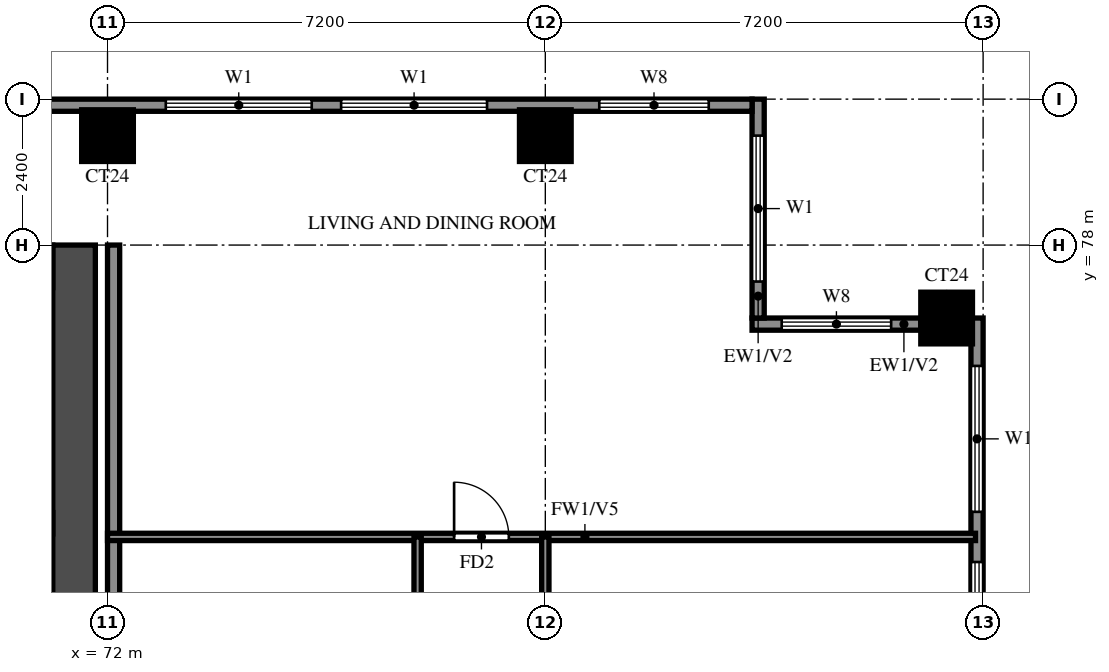
"""IFC4 building model, lengths in metres.
Left out: names, types, materials, properties, quantities, classifications, styles, units other than length and angle.
Written with IfcOpenShell. Run it as: python <this file> out.ifc"""

import sys

from ifc_helpers import new_model, si_unit, direction, frame, frame_2d, origin, origin_2d, place, context, subcontext, project, spatial, rectangle, extrude, source, transform, mapped, element, fill, save


model = new_model("IFC4")
c1 = context("Model", 3, precision=1e-05, world=origin(), true_north=direction((0.0, 1.0)))
c2 = subcontext(c1, "Body", "Model", "MODEL_VIEW")
j1 = project(units=[si_unit("LENGTHUNIT", "METRE"), si_unit("PLANEANGLEUNIT", "RADIAN")], contexts=[c1])
p1 = place(None, origin())
s1 = spatial("IfcSite", under=j1, at=p1, CompositionType="ELEMENT")
p2 = place(p1, origin())
s2 = spatial("IfcBuilding", under=s1, at=p2, CompositionType="ELEMENT")
p3 = place(p2, frame((0.0, 0.0, 153.5)))
s3 = spatial("IfcBuildingStorey", under=s2, at=p3, CompositionType="ELEMENT", Elevation=153.5)
m1 = source(origin(), c2, "Body", "SweptSolid", [
    extrude(rectangle(XDim=0.85, YDim=0.85, at=origin_2d()), origin(), (0.0, 0.0, 1.0), 3.2),
])
for number, where, z_axis, x_axis in (
    (1, (85.8, 76.8, 0.0), (0.0, 0.0, 1.0), (1.0, 0.0, 0.0)),
    (2, (72.0, 79.8, 0.0), (0.0, 0.0, 1.0), (1.0, 0.0, 0.0)),
    (3, (79.2, 79.8, 0.0), (0.0, 0.0, 1.0), (1.0, 0.0, 0.0)),
):
    element("IfcColumn", number, at=place(p3, frame(where, z_axis=z_axis, x_axis=x_axis)), inside=s3, PredefinedType="COLUMN", context=c2, shape_type="MappedRepresentation", body=[
        mapped(m1, transform((0.0, 0.0, 0.0))),
    ])
p4 = place(p3, frame((71.45, 66.1, 0.0), z_axis=(0.0, 0.0, 1.0), x_axis=(0.0, 1.0, 0.0)))
e4 = element("IfcWall", 4, at=p4, inside=s3, PredefinedType="SHEAR", context=c2, shape_type="SweptSolid", body=[
    extrude(rectangle(XDim=11.9, YDim=0.7, at=frame_2d((5.95, 0.0))), origin(), (0.0, 0.0, 1.0), 3.2),
])
p5 = place(p3, frame((29.7, 77.65, 0.0), z_axis=(0.0, 0.0, 1.0), x_axis=(1.0, 0.0, 0.0)))
e5 = element("IfcWall", 5, at=p5, inside=s3, PredefinedType="SHEAR", context=c2, shape_type="SweptSolid", body=[
    extrude(rectangle(XDim=41.4, YDim=0.7, at=frame_2d((20.7, 0.0))), origin(), (0.0, 0.0, 1.0), 3.2),
])
p6 = place(p3, frame((86.3, 48.2, 0.0), z_axis=(0.0, 0.0, 1.0), x_axis=(0.0, 1.0, 0.0)))
e6 = element("IfcWall", 6, at=p6, inside=s3, PredefinedType="SOLIDWALL", context=c2, shape_type="SweptSolid", body=[
    extrude(rectangle(XDim=28.6, YDim=0.2, at=frame_2d((14.3, 0.0))), origin(), (0.0, 0.0, 1.0), 3.2),
])
p7 = place(p6, frame((15.1, 0.0, 0.0)))
e7 = element("IfcOpeningElement", 7, at=p7, cuts=e6, PredefinedType="OPENING", context=c2, shape_type="SweptSolid", body=[
    extrude(rectangle(XDim=1.8, YDim=2.4, at=frame_2d((0.9, 1.2))), frame((0.0, 0.11, 0.0), z_axis=(0.0, -1.0, 0.0), x_axis=(1.0, 0.0, 0.0)), (0.0, 0.0, 1.0), 0.22),
])
p8 = place(p6, frame((0.6, 0.0, 0.6)))
e8 = element("IfcOpeningElement", 8, at=p8, cuts=e6, PredefinedType="OPENING", context=c2, shape_type="SweptSolid", body=[
    extrude(rectangle(XDim=2.4, YDim=2.4, at=frame_2d((1.2, 1.2))), frame((0.0, 0.11, 0.0), z_axis=(0.0, -1.0, 0.0), x_axis=(1.0, 0.0, 0.0)), (0.0, 0.0, 1.0), 0.22),
])
p9 = place(p6, frame((3.812, 0.0, 0.6)))
e9 = element("IfcOpeningElement", 9, at=p9, cuts=e6, PredefinedType="OPENING", context=c2, shape_type="SweptSolid", body=[
    extrude(rectangle(XDim=2.4, YDim=2.4, at=frame_2d((1.2, 1.2))), frame((0.0, 0.11, 0.0), z_axis=(0.0, -1.0, 0.0), x_axis=(1.0, 0.0, 0.0)), (0.0, 0.0, 1.0), 0.22),
])
p10 = place(p6, frame((8.387, 0.0, 0.6)))
e10 = element("IfcOpeningElement", 10, at=p10, cuts=e6, PredefinedType="OPENING", context=c2, shape_type="SweptSolid", body=[
    extrude(rectangle(XDim=2.4, YDim=2.4, at=frame_2d((1.2, 1.2))), frame((0.0, 0.11, 0.0), z_axis=(0.0, -1.0, 0.0), x_axis=(1.0, 0.0, 0.0)), (0.0, 0.0, 1.0), 0.22),
])
p11 = place(p6, frame((12.512, 0.0, 0.6)))
e11 = element("IfcOpeningElement", 11, at=p11, cuts=e6, PredefinedType="OPENING", context=c2, shape_type="SweptSolid", body=[
    extrude(rectangle(XDim=1.2, YDim=2.4, at=frame_2d((0.6, 1.2))), frame((0.0, 0.11, 0.0), z_axis=(0.0, -1.0, 0.0), x_axis=(1.0, 0.0, 0.0)), (0.0, 0.0, 1.0), 0.22),
])
p12 = place(p6, frame((19.113, 0.0, 0.6)))
e12 = element("IfcOpeningElement", 12, at=p12, cuts=e6, PredefinedType="OPENING", context=c2, shape_type="SweptSolid", body=[
    extrude(rectangle(XDim=1.8, YDim=2.4, at=frame_2d((0.9, 1.2))), frame((0.0, 0.11, 0.0), z_axis=(0.0, -1.0, 0.0), x_axis=(1.0, 0.0, 0.0)), (0.0, 0.0, 1.0), 0.22),
])
p13 = place(p6, frame((22.188, 0.0, 0.6)))
e13 = element("IfcOpeningElement", 13, at=p13, cuts=e6, PredefinedType="OPENING", context=c2, shape_type="SweptSolid", body=[
    extrude(rectangle(XDim=2.4, YDim=2.4, at=frame_2d((1.2, 1.2))), frame((0.0, 0.11, 0.0), z_axis=(0.0, -1.0, 0.0), x_axis=(1.0, 0.0, 0.0)), (0.0, 0.0, 1.0), 0.22),
])
p14 = place(p6, frame((25.413, 0.0, 0.6)))
e14 = element("IfcOpeningElement", 14, at=p14, cuts=e6, PredefinedType="OPENING", context=c2, shape_type="SweptSolid", body=[
    extrude(rectangle(XDim=2.4, YDim=2.4, at=frame_2d((1.2, 1.2))), frame((0.0, 0.11, 0.0), z_axis=(0.0, -1.0, 0.0), x_axis=(1.0, 0.0, 0.0)), (0.0, 0.0, 1.0), 0.22),
])
p15 = place(p3, frame((85.375, 76.7, 0.0), z_axis=(0.0, 0.0, 1.0), x_axis=(-1.0, 0.0, 0.0)))
e15 = element("IfcWall", 15, at=p15, inside=s3, PredefinedType="SOLIDWALL", context=c2, shape_type="SweptSolid", body=[
    extrude(rectangle(XDim=2.775, YDim=0.2, at=frame_2d((1.387, 0.0))), origin(), (0.0, 0.0, 1.0), 3.2),
])
p16 = place(p15, frame((0.488, 0.0, 0.6)))
e16 = element("IfcOpeningElement", 16, at=p16, cuts=e15, PredefinedType="OPENING", context=c2, shape_type="SweptSolid", body=[
    extrude(rectangle(XDim=1.8, YDim=2.4, at=frame_2d((0.9, 1.2))), frame((0.0, 0.11, 0.0), z_axis=(0.0, -1.0, 0.0), x_axis=(1.0, 0.0, 0.0)), (0.0, 0.0, 1.0), 0.22),
])
p17 = place(p3, frame((82.7, 76.8, 0.0), z_axis=(0.0, 0.0, 1.0), x_axis=(0.0, 1.0, 0.0)))
e17 = element("IfcWall", 17, at=p17, inside=s3, PredefinedType="SOLIDWALL", context=c2, shape_type="SweptSolid", body=[
    extrude(rectangle(XDim=3.6, YDim=0.2, at=frame_2d((1.8, 0.0))), origin(), (0.0, 0.0, 1.0), 3.2),
])
p18 = place(p17, frame((0.6, 0.0, 0.6)))
e18 = element("IfcOpeningElement", 18, at=p18, cuts=e17, PredefinedType="OPENING", context=c2, shape_type="SweptSolid", body=[
    extrude(rectangle(XDim=2.4, YDim=2.4, at=frame_2d((1.2, 1.2))), frame((0.0, 0.11, 0.0), z_axis=(0.0, -1.0, 0.0), x_axis=(1.0, 0.0, 0.0)), (0.0, 0.0, 1.0), 0.22),
])
p19 = place(p3, frame((82.6, 80.3, 0.0), z_axis=(0.0, 0.0, 1.0), x_axis=(-1.0, 0.0, 0.0)))
e19 = element("IfcWall", 19, at=p19, inside=s3, PredefinedType="SOLIDWALL", context=c2, shape_type="SweptSolid", body=[
    extrude(rectangle(XDim=64.6, YDim=0.2, at=frame_2d((32.3, 0.0))), origin(), (0.0, 0.0, 1.0), 3.2),
])
p20 = place(p19, frame((58.3, 0.0, 0.0)))
e20 = element("IfcOpeningElement", 20, at=p20, cuts=e19, PredefinedType="OPENING", context=c2, shape_type="SweptSolid", body=[
    extrude(rectangle(XDim=1.8, YDim=2.4, at=frame_2d((0.9, 1.2))), frame((0.0, 0.11, 0.0), z_axis=(0.0, -1.0, 0.0), x_axis=(1.0, 0.0, 0.0)), (0.0, 0.0, 1.0), 0.22),
])
p21 = place(p19, frame((54.288, 0.0, 0.6)))
e21 = element("IfcOpeningElement", 21, at=p21, cuts=e19, PredefinedType="OPENING", context=c2, shape_type="SweptSolid", body=[
    extrude(rectangle(XDim=1.8, YDim=2.4, at=frame_2d((0.9, 1.2))), frame((0.0, 0.11, 0.0), z_axis=(0.0, -1.0, 0.0), x_axis=(1.0, 0.0, 0.0)), (0.0, 0.0, 1.0), 0.22),
])
p22 = place(p19, frame((56.95, 0.0, 0.6)))
e22 = element("IfcOpeningElement", 22, at=p22, cuts=e19, PredefinedType="OPENING", context=c2, shape_type="SweptSolid", body=[
    extrude(rectangle(XDim=0.9, YDim=2.4, at=frame_2d((0.45, 1.2))), frame((0.0, 0.11, 0.0), z_axis=(0.0, -1.0, 0.0), x_axis=(1.0, 0.0, 0.0)), (0.0, 0.0, 1.0), 0.22),
])
p23 = place(p19, frame((61.488, 0.0, 0.6)))
e23 = element("IfcOpeningElement", 23, at=p23, cuts=e19, PredefinedType="OPENING", context=c2, shape_type="SweptSolid", body=[
    extrude(rectangle(XDim=1.2, YDim=2.4, at=frame_2d((0.6, 1.2))), frame((0.0, 0.11, 0.0), z_axis=(0.0, -1.0, 0.0), x_axis=(1.0, 0.0, 0.0)), (0.0, 0.0, 1.0), 0.22),
])
p24 = place(p19, frame((0.712, 0.0, 0.6)))
e24 = element("IfcOpeningElement", 24, at=p24, cuts=e19, PredefinedType="OPENING", context=c2, shape_type="SweptSolid", body=[
    extrude(rectangle(XDim=1.8, YDim=2.4, at=frame_2d((0.9, 1.2))), frame((0.0, 0.11, 0.0), z_axis=(0.0, -1.0, 0.0), x_axis=(1.0, 0.0, 0.0)), (0.0, 0.0, 1.0), 0.22),
])
p25 = place(p19, frame((4.358, 0.0, 0.6)))
e25 = element("IfcOpeningElement", 25, at=p25, cuts=e19, PredefinedType="OPENING", context=c2, shape_type="SweptSolid", body=[
    extrude(rectangle(XDim=2.4, YDim=2.4, at=frame_2d((1.2, 1.2))), frame((0.0, 0.11, 0.0), z_axis=(0.0, -1.0, 0.0), x_axis=(1.0, 0.0, 0.0)), (0.0, 0.0, 1.0), 0.22),
])
p26 = place(p19, frame((7.242, 0.0, 0.6)))
e26 = element("IfcOpeningElement", 26, at=p26, cuts=e19, PredefinedType="OPENING", context=c2, shape_type="SweptSolid", body=[
    extrude(rectangle(XDim=2.4, YDim=2.4, at=frame_2d((1.2, 1.2))), frame((0.0, 0.11, 0.0), z_axis=(0.0, -1.0, 0.0), x_axis=(1.0, 0.0, 0.0)), (0.0, 0.0, 1.0), 0.22),
])
p27 = place(p3, frame((72.1, 62.4, 0.0), z_axis=(0.0, 0.0, 1.0), x_axis=(0.0, 1.0, 0.0)))
e27 = element("IfcWall", 27, at=p27, inside=s3, PredefinedType="SOLIDWALL", context=c2, shape_type="SweptSolid", body=[
    extrude(rectangle(XDim=15.6, YDim=0.2, at=frame_2d((7.8, 0.0))), origin(), (0.0, 0.0, 1.0), 3.2),
])
p28 = place(p3, frame((72.0, 73.2, 0.0), z_axis=(0.0, 0.0, 1.0), x_axis=(1.0, 0.0, 0.0)))
e28 = element("IfcWall", 28, at=p28, inside=s3, PredefinedType="PARTITIONING", context=c2, shape_type="SweptSolid", body=[
    extrude(rectangle(XDim=14.275, YDim=0.12, at=frame_2d((7.137, 0.0))), origin(), (0.0, 0.0, 1.0), 2.3),
])
p29 = place(p28, frame((5.7, 0.0, 0.0)))
e29 = element("IfcOpeningElement", 29, at=p29, cuts=e28, PredefinedType="OPENING", context=c2, shape_type="SweptSolid", body=[
    extrude(rectangle(XDim=0.9, YDim=2.1, at=frame_2d((0.45, 1.05))), frame((0.0, 0.07, 0.0), z_axis=(0.0, -1.0, 0.0), x_axis=(1.0, 0.0, 0.0)), (0.0, 0.0, 1.0), 0.14),
])
p30 = place(p3, frame((77.1, 64.8, 0.0), z_axis=(0.0, 0.0, 1.0), x_axis=(0.0, 1.0, 0.0)))
e30 = element("IfcWall", 30, at=p30, inside=s3, PredefinedType="PARTITIONING", context=c2, shape_type="SweptSolid", body=[
    extrude(rectangle(XDim=8.4, YDim=0.12, at=frame_2d((4.2, 0.0))), origin(), (0.0, 0.0, 1.0), 3.2),
])
p31 = place(p30, frame((6.125, 0.0, 0.0)))
e31 = element("IfcOpeningElement", 31, at=p31, cuts=e30, PredefinedType="OPENING", context=c2, shape_type="SweptSolid", body=[
    extrude(rectangle(XDim=0.8, YDim=2.1, at=frame_2d((0.4, 1.05))), frame((0.0, 0.07, 0.0), z_axis=(0.0, -1.0, 0.0), x_axis=(1.0, 0.0, 0.0)), (0.0, 0.0, 1.0), 0.14),
])
p32 = place(p3, frame((79.2, 48.125, 0.0), z_axis=(0.0, 0.0, 1.0), x_axis=(0.0, 1.0, 0.0)))
e32 = element("IfcWall", 32, at=p32, inside=s3, PredefinedType="PARTITIONING", context=c2, shape_type="SweptSolid", body=[
    extrude(rectangle(XDim=25.075, YDim=0.12, at=frame_2d((12.538, 0.0))), origin(), (0.0, 0.0, 1.0), 3.2),
])
p33 = place(p32, frame((1.288, 0.0, 0.0)))
e33 = element("IfcOpeningElement", 33, at=p33, cuts=e32, PredefinedType="OPENING", context=c2, shape_type="SweptSolid", body=[
    extrude(rectangle(XDim=0.9, YDim=2.1, at=frame_2d((0.45, 1.05))), frame((0.0, 0.07, 0.0), z_axis=(0.0, -1.0, 0.0), x_axis=(1.0, 0.0, 0.0)), (0.0, 0.0, 1.0), 0.14),
])
p34 = place(p32, frame((4.825, 0.0, 0.0)))
e34 = element("IfcOpeningElement", 34, at=p34, cuts=e32, PredefinedType="OPENING", context=c2, shape_type="SweptSolid", body=[
    extrude(rectangle(XDim=0.9, YDim=2.1, at=frame_2d((0.45, 1.05))), frame((0.0, 0.07, 0.0), z_axis=(0.0, -1.0, 0.0), x_axis=(1.0, 0.0, 0.0)), (0.0, 0.0, 1.0), 0.14),
])
p35 = place(p32, frame((9.925, 0.0, 0.0)))
e35 = element("IfcOpeningElement", 35, at=p35, cuts=e32, PredefinedType="OPENING", context=c2, shape_type="SweptSolid", body=[
    extrude(rectangle(XDim=1.5, YDim=2.1, at=frame_2d((0.75, 1.05))), frame((0.0, 0.07, 0.0), z_axis=(0.0, -1.0, 0.0), x_axis=(1.0, 0.0, 0.0)), (0.0, 0.0, 1.0), 0.14),
])
p36 = place(p32, frame((15.625, 0.0, 0.0)))
e36 = element("IfcOpeningElement", 36, at=p36, cuts=e32, PredefinedType="OPENING", context=c2, shape_type="SweptSolid", body=[
    extrude(rectangle(XDim=0.9, YDim=2.1, at=frame_2d((0.45, 1.05))), frame((0.0, 0.07, 0.0), z_axis=(0.0, -1.0, 0.0), x_axis=(1.0, 0.0, 0.0)), (0.0, 0.0, 1.0), 0.14),
])
p37 = place(p32, frame((19.225, 0.0, 0.0)))
e37 = element("IfcOpeningElement", 37, at=p37, cuts=e32, PredefinedType="OPENING", context=c2, shape_type="SweptSolid", body=[
    extrude(rectangle(XDim=0.9, YDim=2.1, at=frame_2d((0.45, 1.05))), frame((0.0, 0.07, 0.0), z_axis=(0.0, -1.0, 0.0), x_axis=(1.0, 0.0, 0.0)), (0.0, 0.0, 1.0), 0.14),
])
p38 = place(p32, frame((22.825, 0.0, 0.0)))
e38 = element("IfcOpeningElement", 38, at=p38, cuts=e32, PredefinedType="OPENING", context=c2, shape_type="SweptSolid", body=[
    extrude(rectangle(XDim=0.9, YDim=2.1, at=frame_2d((0.45, 1.05))), frame((0.0, 0.07, 0.0), z_axis=(0.0, -1.0, 0.0), x_axis=(1.0, 0.0, 0.0)), (0.0, 0.0, 1.0), 0.14),
])
p39 = place(p13, origin())
e39 = element("IfcWindow", 39, at=p39, inside=s3, PartitioningType="DOUBLE_PANEL_VERTICAL", PredefinedType="WINDOW", context=c2, shape_type="SweptSolid", body=[
    extrude(rectangle(XDim=2.4, YDim=2.4, at=frame_2d((1.2, 1.2))), frame((0.0, 0.03, 0.0), z_axis=(0.0, -1.0, 0.0), x_axis=(1.0, 0.0, 0.0)), (0.0, 0.0, 1.0), 0.06),
])
fill(e13, e39)
p40 = place(p14, origin())
e40 = element("IfcWindow", 40, at=p40, inside=s3, PartitioningType="DOUBLE_PANEL_VERTICAL", PredefinedType="WINDOW", context=c2, shape_type="SweptSolid", body=[
    extrude(rectangle(XDim=2.4, YDim=2.4, at=frame_2d((1.2, 1.2))), frame((0.0, 0.03, 0.0), z_axis=(0.0, -1.0, 0.0), x_axis=(1.0, 0.0, 0.0)), (0.0, 0.0, 1.0), 0.06),
])
fill(e14, e40)
p41 = place(p16, origin())
e41 = element("IfcWindow", 41, at=p41, inside=s3, PartitioningType="DOUBLE_PANEL_VERTICAL", PredefinedType="WINDOW", context=c2, shape_type="SweptSolid", body=[
    extrude(rectangle(XDim=1.8, YDim=2.4, at=frame_2d((0.9, 1.2))), frame((0.0, 0.03, 0.0), z_axis=(0.0, -1.0, 0.0), x_axis=(1.0, 0.0, 0.0)), (0.0, 0.0, 1.0), 0.06),
])
fill(e16, e41)
p42 = place(p18, origin())
e42 = element("IfcWindow", 42, at=p42, inside=s3, PartitioningType="DOUBLE_PANEL_VERTICAL", PredefinedType="WINDOW", context=c2, shape_type="SweptSolid", body=[
    extrude(rectangle(XDim=2.4, YDim=2.4, at=frame_2d((1.2, 1.2))), frame((0.0, 0.03, 0.0), z_axis=(0.0, -1.0, 0.0), x_axis=(1.0, 0.0, 0.0)), (0.0, 0.0, 1.0), 0.06),
])
fill(e18, e42)
p43 = place(p24, origin())
e43 = element("IfcWindow", 43, at=p43, inside=s3, PartitioningType="DOUBLE_PANEL_VERTICAL", PredefinedType="WINDOW", context=c2, shape_type="SweptSolid", body=[
    extrude(rectangle(XDim=1.8, YDim=2.4, at=frame_2d((0.9, 1.2))), frame((0.0, 0.03, 0.0), z_axis=(0.0, -1.0, 0.0), x_axis=(1.0, 0.0, 0.0)), (0.0, 0.0, 1.0), 0.06),
])
fill(e24, e43)
p44 = place(p25, origin())
e44 = element("IfcWindow", 44, at=p44, inside=s3, PartitioningType="DOUBLE_PANEL_VERTICAL", PredefinedType="WINDOW", context=c2, shape_type="SweptSolid", body=[
    extrude(rectangle(XDim=2.4, YDim=2.4, at=frame_2d((1.2, 1.2))), frame((0.0, 0.03, 0.0), z_axis=(0.0, -1.0, 0.0), x_axis=(1.0, 0.0, 0.0)), (0.0, 0.0, 1.0), 0.06),
])
fill(e25, e44)
p45 = place(p26, origin())
e45 = element("IfcWindow", 45, at=p45, inside=s3, PartitioningType="DOUBLE_PANEL_VERTICAL", PredefinedType="WINDOW", context=c2, shape_type="SweptSolid", body=[
    extrude(rectangle(XDim=2.4, YDim=2.4, at=frame_2d((1.2, 1.2))), frame((0.0, 0.03, 0.0), z_axis=(0.0, -1.0, 0.0), x_axis=(1.0, 0.0, 0.0)), (0.0, 0.0, 1.0), 0.06),
])
fill(e26, e45)
p46 = place(p29, origin())
e46 = element("IfcDoor", 46, at=p46, inside=s3, OperationType="SINGLE_SWING_RIGHT", PredefinedType="DOOR", context=c2, shape_type="SweptSolid", body=[
    extrude(rectangle(XDim=0.9, YDim=2.1, at=frame_2d((0.45, 1.05))), frame((0.0, 0.025, 0.0), z_axis=(0.0, -1.0, 0.0), x_axis=(1.0, 0.0, 0.0)), (0.0, 0.0, 1.0), 0.05),
])
fill(e29, e46)
save(model, sys.argv[1])
